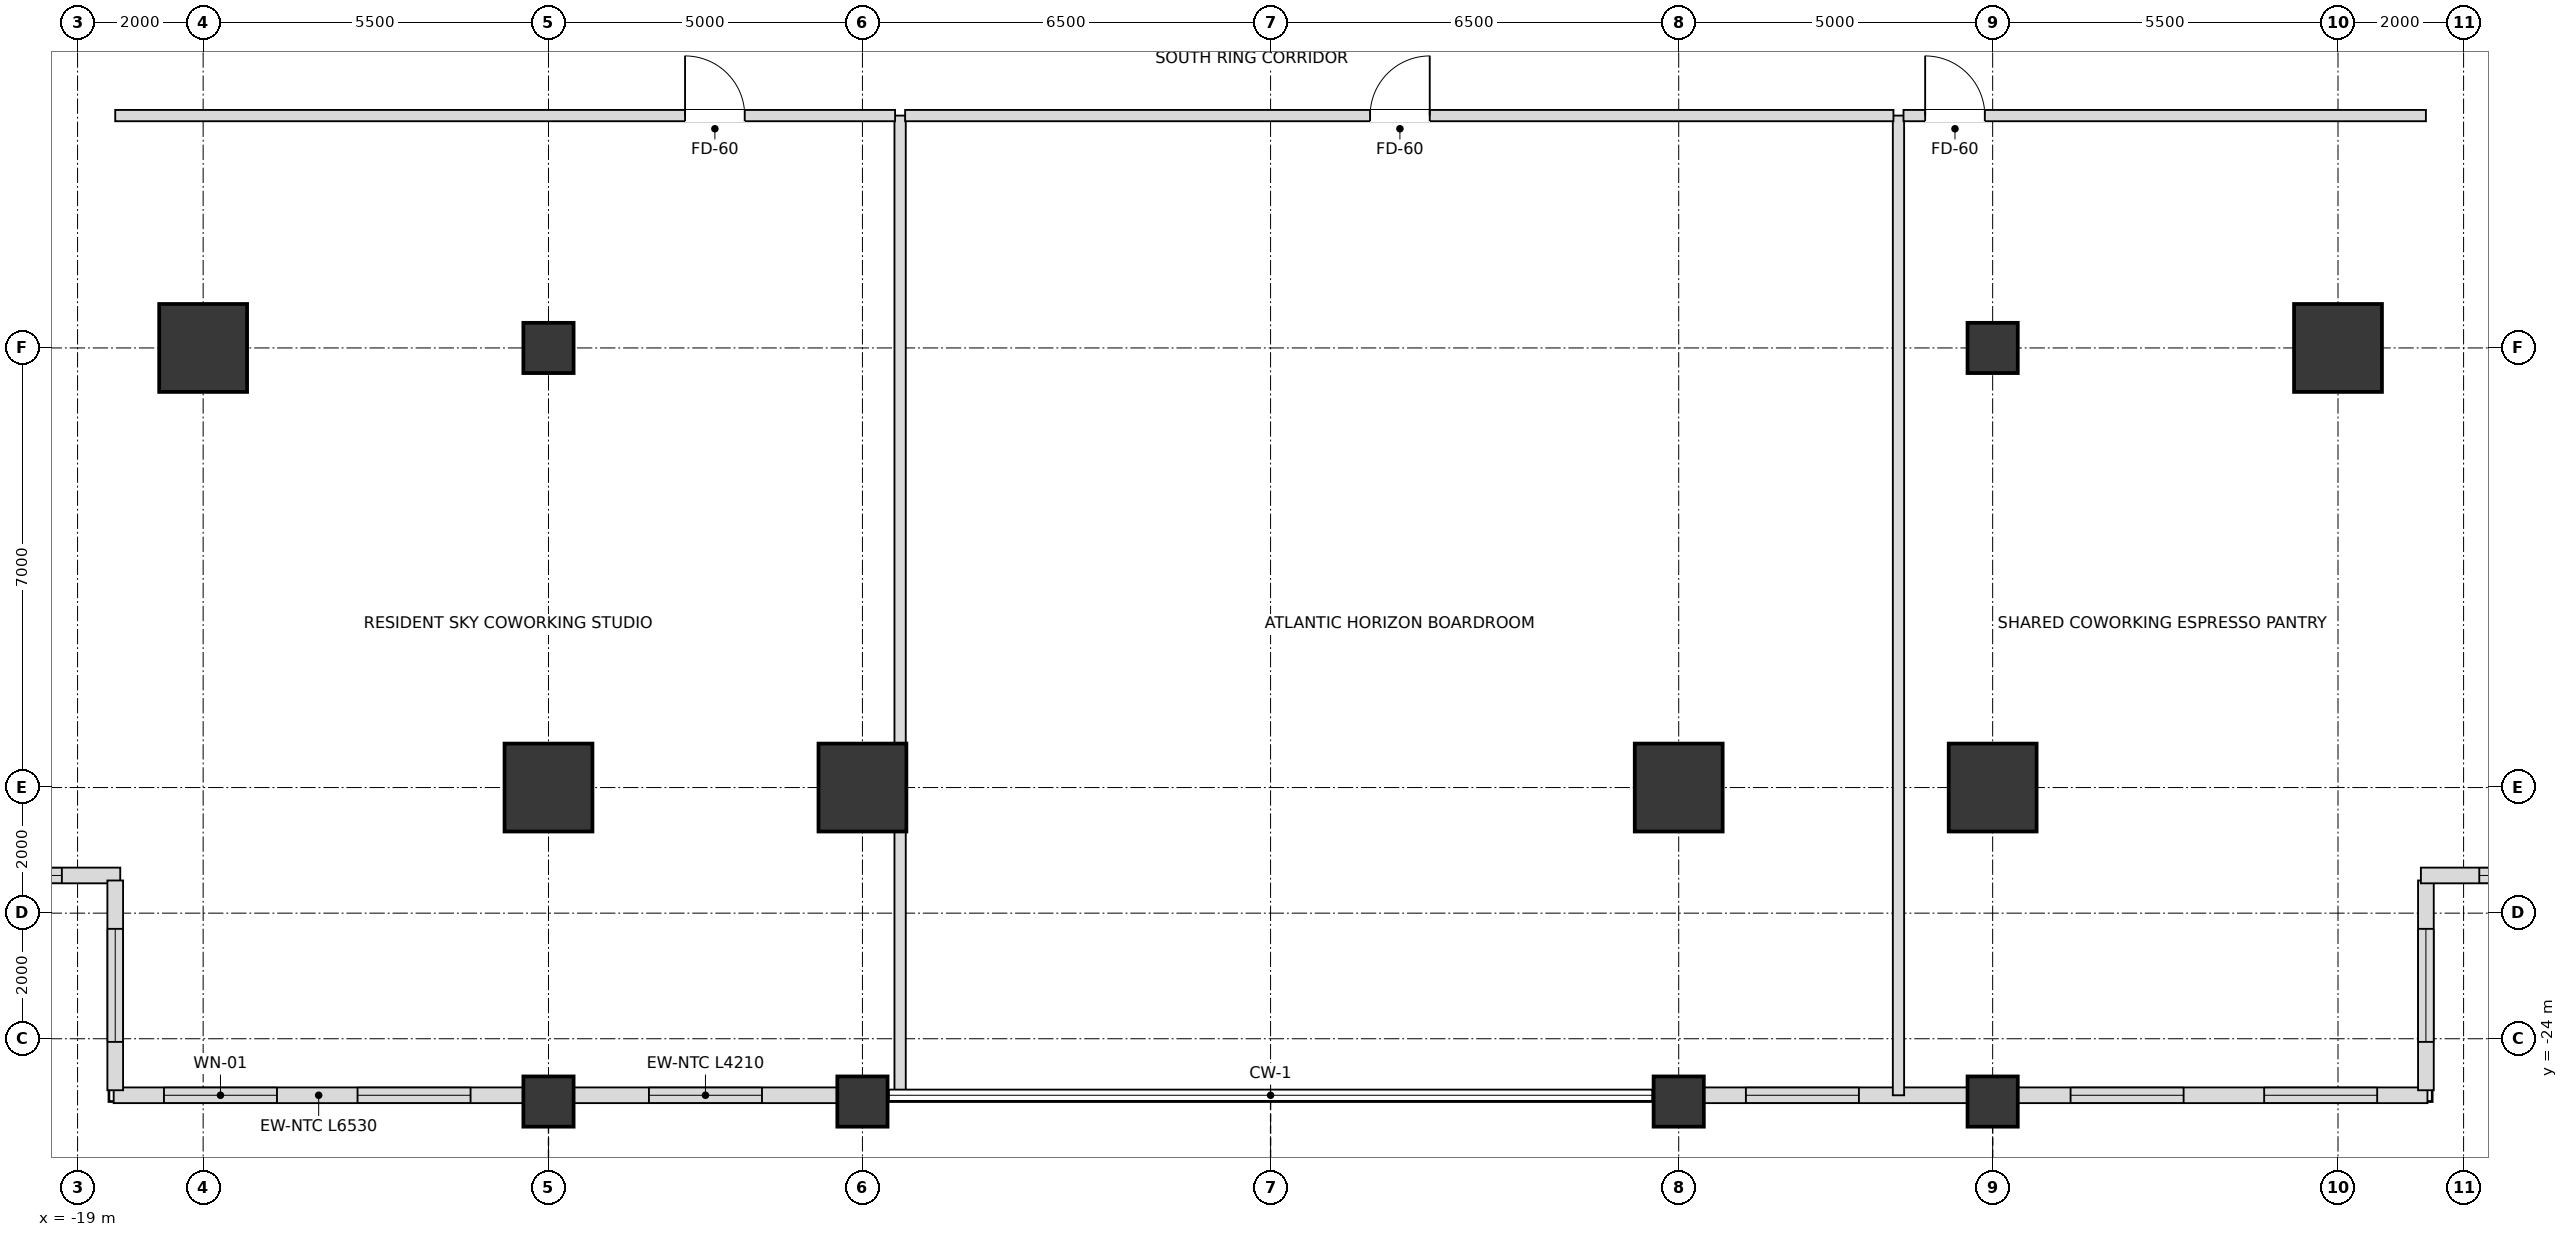
"""IFC4 building model, lengths in metres.
Left out: names, types, materials, properties, quantities, classifications, styles, units other than length and angle.
Written with IfcOpenShell. Run it as: python <this file> out.ifc"""

import sys

from ifc_helpers import new_model, si_unit, direction, frame, frame_2d, origin, origin_2d, place, context, subcontext, project, spatial, rectangle, extrude, element, fill, save


model = new_model("IFC4")
c1 = context("Model", 3, precision=1e-05, world=origin(), true_north=direction((0.0, 1.0)))
c2 = subcontext(c1, "Body", "Model", "MODEL_VIEW")
j1 = project(units=[si_unit("LENGTHUNIT", "METRE"), si_unit("PLANEANGLEUNIT", "RADIAN")], contexts=[c1])
p1 = place(None, origin())
s1 = spatial("IfcSite", under=j1, at=p1, CompositionType="ELEMENT")
p2 = place(p1, origin())
s2 = spatial("IfcBuilding", under=s1, at=p2, CompositionType="ELEMENT")
p3 = place(p2, frame((0.0, 0.0, 61.2)))
s3 = spatial("IfcBuildingStorey", under=s2, at=p3, CompositionType="ELEMENT", Elevation=61.2)
for number, where, z_axis, x_axis in (
    (1, (-11.5, -20.0, 0.0), (0.0, 0.0, 1.0), (1.0, 0.0, 0.0)),
    (2, (-6.5, -20.0, 0.0), (0.0, 0.0, 1.0), (1.0, 0.0, 0.0)),
    (3, (6.5, -20.0, 0.0), (0.0, 0.0, 1.0), (1.0, 0.0, 0.0)),
    (4, (11.5, -20.0, 0.0), (0.0, 0.0, 1.0), (1.0, 0.0, 0.0)),
    (5, (17.0, -13.0, 0.0), (0.0, 0.0, 1.0), (1.0, 0.0, 0.0)),
    (6, (-17.0, -13.0, 0.0), (0.0, 0.0, 1.0), (1.0, 0.0, 0.0)),
):
    element("IfcColumn", number, at=place(p3, frame(where, z_axis=z_axis, x_axis=x_axis)), inside=s3, PredefinedType="USERDEFINED", context=c2, shape_type="SweptSolid", body=[
        extrude(rectangle(XDim=1.4, YDim=1.4, at=origin_2d()), origin(), (0.0, 0.0, 1.0), 3.6),
    ])
for number, where, z_axis, x_axis in (
    (7, (-11.5, -13.0, 0.0), (0.0, 0.0, 1.0), (1.0, 0.0, 0.0)),
    (8, (11.5, -13.0, 0.0), (0.0, 0.0, 1.0), (1.0, 0.0, 0.0)),
    (9, (-11.5, -25.0, 0.0), (0.0, 0.0, 1.0), (1.0, 0.0, 0.0)),
    (10, (-6.5, -25.0, 0.0), (0.0, 0.0, 1.0), (1.0, 0.0, 0.0)),
    (11, (6.5, -25.0, 0.0), (0.0, 0.0, 1.0), (1.0, 0.0, 0.0)),
    (12, (11.5, -25.0, 0.0), (0.0, 0.0, 1.0), (1.0, 0.0, 0.0)),
):
    element("IfcColumn", number, at=place(p3, frame(where, z_axis=z_axis, x_axis=x_axis)), inside=s3, PredefinedType="COLUMN", context=c2, shape_type="SweptSolid", body=[
        extrude(rectangle(XDim=0.8, YDim=0.8, at=origin_2d()), origin(), (0.0, 0.0, 1.0), 3.6),
    ])
p4 = place(p3, frame((-18.425, -24.9, 0.0), z_axis=(0.0, 0.0, 1.0), x_axis=(1.0, 0.0, 0.0)))
e13 = element("IfcWall", 13, at=p4, inside=s3, PredefinedType="SOLIDWALL", context=c2, shape_type="SweptSolid", body=[
    extrude(rectangle(XDim=6.53, YDim=0.25, at=frame_2d((3.265, 0.0))), origin(), (0.0, 0.0, 1.0), 2.736),
])
p5 = place(p4, frame((0.801, 0.0, 0.72)))
e14 = element("IfcOpeningElement", 14, at=p5, cuts=e13, PredefinedType="OPENING", context=c2, shape_type="SweptSolid", body=[
    extrude(rectangle(XDim=1.8, YDim=1.68, at=frame_2d((0.9, 0.84))), frame((0.0, 0.135, 0.0), z_axis=(0.0, -1.0, 0.0), x_axis=(1.0, 0.0, 0.0)), (0.0, 0.0, 1.0), 0.27),
])
p6 = place(p4, frame((3.884, 0.0, 0.72)))
e15 = element("IfcOpeningElement", 15, at=p6, cuts=e13, PredefinedType="OPENING", context=c2, shape_type="SweptSolid", body=[
    extrude(rectangle(XDim=1.8, YDim=1.68, at=frame_2d((0.9, 0.84))), frame((0.0, 0.135, 0.0), z_axis=(0.0, -1.0, 0.0), x_axis=(1.0, 0.0, 0.0)), (0.0, 0.0, 1.0), 0.27),
])
p7 = place(p3, frame((-11.105, -24.9, 0.0), z_axis=(0.0, 0.0, 1.0), x_axis=(1.0, 0.0, 0.0)))
e16 = element("IfcWall", 16, at=p7, inside=s3, PredefinedType="SOLIDWALL", context=c2, shape_type="SweptSolid", body=[
    extrude(rectangle(XDim=4.21, YDim=0.25, at=frame_2d((2.105, 0.0))), origin(), (0.0, 0.0, 1.0), 2.736),
])
p8 = place(p7, frame((1.205, 0.0, 0.72)))
e17 = element("IfcOpeningElement", 17, at=p8, cuts=e16, PredefinedType="OPENING", context=c2, shape_type="SweptSolid", body=[
    extrude(rectangle(XDim=1.8, YDim=1.68, at=frame_2d((0.9, 0.84))), frame((0.0, 0.135, 0.0), z_axis=(0.0, -1.0, 0.0), x_axis=(1.0, 0.0, 0.0)), (0.0, 0.0, 1.0), 0.27),
])
p9 = place(p3, frame((6.895, -24.9, 0.0), z_axis=(0.0, 0.0, 1.0), x_axis=(1.0, 0.0, 0.0)))
e18 = element("IfcWall", 18, at=p9, inside=s3, PredefinedType="SOLIDWALL", context=c2, shape_type="SweptSolid", body=[
    extrude(rectangle(XDim=4.21, YDim=0.25, at=frame_2d((2.105, 0.0))), origin(), (0.0, 0.0, 1.0), 2.736),
])
p10 = place(p9, frame((0.675, 0.0, 0.72)))
e19 = element("IfcOpeningElement", 19, at=p10, cuts=e18, PredefinedType="OPENING", context=c2, shape_type="SweptSolid", body=[
    extrude(rectangle(XDim=1.8, YDim=1.68, at=frame_2d((0.9, 0.84))), frame((0.0, 0.135, 0.0), z_axis=(0.0, -1.0, 0.0), x_axis=(1.0, 0.0, 0.0)), (0.0, 0.0, 1.0), 0.27),
])
p11 = place(p3, frame((11.895, -24.9, 0.0), z_axis=(0.0, 0.0, 1.0), x_axis=(1.0, 0.0, 0.0)))
e20 = element("IfcWall", 20, at=p11, inside=s3, PredefinedType="SOLIDWALL", context=c2, shape_type="SweptSolid", body=[
    extrude(rectangle(XDim=6.53, YDim=0.25, at=frame_2d((3.265, 0.0))), origin(), (0.0, 0.0, 1.0), 2.736),
])
p12 = place(p11, frame((0.846, 0.0, 0.72)))
e21 = element("IfcOpeningElement", 21, at=p12, cuts=e20, PredefinedType="OPENING", context=c2, shape_type="SweptSolid", body=[
    extrude(rectangle(XDim=1.8, YDim=1.68, at=frame_2d((0.9, 0.84))), frame((0.0, 0.135, 0.0), z_axis=(0.0, -1.0, 0.0), x_axis=(1.0, 0.0, 0.0)), (0.0, 0.0, 1.0), 0.27),
])
p13 = place(p11, frame((3.929, 0.0, 0.72)))
e22 = element("IfcOpeningElement", 22, at=p13, cuts=e20, PredefinedType="OPENING", context=c2, shape_type="SweptSolid", body=[
    extrude(rectangle(XDim=1.8, YDim=1.68, at=frame_2d((0.9, 0.84))), frame((0.0, 0.135, 0.0), z_axis=(0.0, -1.0, 0.0), x_axis=(1.0, 0.0, 0.0)), (0.0, 0.0, 1.0), 0.27),
])
p14 = place(p3, frame((-21.98, -21.4, 0.0), z_axis=(0.0, 0.0, 1.0), x_axis=(1.0, 0.0, 0.0)))
e23 = element("IfcWall", 23, at=p14, inside=s3, PredefinedType="SOLIDWALL", context=c2, shape_type="SweptSolid", body=[
    extrude(rectangle(XDim=3.66, YDim=0.25, at=frame_2d((1.83, 0.0))), origin(), (0.0, 0.0, 1.0), 2.736),
])
p15 = place(p14, frame((0.93, 0.0, 0.72)))
e24 = element("IfcOpeningElement", 24, at=p15, cuts=e23, PredefinedType="OPENING", context=c2, shape_type="SweptSolid", body=[
    extrude(rectangle(XDim=1.8, YDim=1.68, at=frame_2d((0.9, 0.84))), frame((0.0, 0.135, 0.0), z_axis=(0.0, -1.0, 0.0), x_axis=(1.0, 0.0, 0.0)), (0.0, 0.0, 1.0), 0.27),
])
p16 = place(p3, frame((-18.4, -21.48, 0.0), z_axis=(0.0, 0.0, 1.0), x_axis=(0.0, -1.0, 0.0)))
e25 = element("IfcWall", 25, at=p16, inside=s3, PredefinedType="SOLIDWALL", context=c2, shape_type="SweptSolid", body=[
    extrude(rectangle(XDim=3.34, YDim=0.25, at=frame_2d((1.67, 0.0))), origin(), (0.0, 0.0, 1.0), 2.736),
])
p17 = place(p16, frame((0.77, 0.0, 0.72)))
e26 = element("IfcOpeningElement", 26, at=p17, cuts=e25, PredefinedType="OPENING", context=c2, shape_type="SweptSolid", body=[
    extrude(rectangle(XDim=1.8, YDim=1.68, at=frame_2d((0.9, 0.84))), frame((0.0, 0.135, 0.0), z_axis=(0.0, -1.0, 0.0), x_axis=(1.0, 0.0, 0.0)), (0.0, 0.0, 1.0), 0.27),
])
p18 = place(p3, frame((18.4, -24.82, 0.0), z_axis=(0.0, 0.0, 1.0), x_axis=(0.0, 1.0, 0.0)))
e27 = element("IfcWall", 27, at=p18, inside=s3, PredefinedType="SOLIDWALL", context=c2, shape_type="SweptSolid", body=[
    extrude(rectangle(XDim=3.34, YDim=0.25, at=frame_2d((1.67, 0.0))), origin(), (0.0, 0.0, 1.0), 2.736),
])
p19 = place(p18, frame((0.77, 0.0, 0.72)))
e28 = element("IfcOpeningElement", 28, at=p19, cuts=e27, PredefinedType="OPENING", context=c2, shape_type="SweptSolid", body=[
    extrude(rectangle(XDim=1.8, YDim=1.68, at=frame_2d((0.9, 0.84))), frame((0.0, 0.135, 0.0), z_axis=(0.0, -1.0, 0.0), x_axis=(1.0, 0.0, 0.0)), (0.0, 0.0, 1.0), 0.27),
])
p20 = place(p3, frame((18.32, -21.4, 0.0), z_axis=(0.0, 0.0, 1.0), x_axis=(1.0, 0.0, 0.0)))
e29 = element("IfcWall", 29, at=p20, inside=s3, PredefinedType="SOLIDWALL", context=c2, shape_type="SweptSolid", body=[
    extrude(rectangle(XDim=3.66, YDim=0.25, at=frame_2d((1.83, 0.0))), origin(), (0.0, 0.0, 1.0), 2.736),
])
p21 = place(p20, frame((0.93, 0.0, 0.72)))
e30 = element("IfcOpeningElement", 30, at=p21, cuts=e29, PredefinedType="OPENING", context=c2, shape_type="SweptSolid", body=[
    extrude(rectangle(XDim=1.8, YDim=1.68, at=frame_2d((0.9, 0.84))), frame((0.0, 0.135, 0.0), z_axis=(0.0, -1.0, 0.0), x_axis=(1.0, 0.0, 0.0)), (0.0, 0.0, 1.0), 0.27),
])
for number, where, z_axis, x_axis in (
    (31, (-5.9, -24.9, 0.0), (0.0, 0.0, 1.0), (0.0, 1.0, 0.0)),
    (32, (10.0, -24.9, 0.0), (0.0, 0.0, 1.0), (0.0, 1.0, 0.0)),
):
    element("IfcWall", number, at=place(p3, frame(where, z_axis=z_axis, x_axis=x_axis)), inside=s3, PredefinedType="PARTITIONING", context=c2, shape_type="SweptSolid", body=[
        extrude(rectangle(XDim=15.6, YDim=0.18, at=frame_2d((7.8, 0.0))), origin(), (0.0, 0.0, 1.0), 2.816),
    ])
p22 = place(p3, frame((-18.4, -9.3, 0.0), z_axis=(0.0, 0.0, 1.0), x_axis=(1.0, 0.0, 0.0)))
e33 = element("IfcWall", 33, at=p22, inside=s3, PredefinedType="PARTITIONING", context=c2, shape_type="SweptSolid", body=[
    extrude(rectangle(XDim=12.42, YDim=0.18, at=frame_2d((6.21, 0.0))), origin(), (0.0, 0.0, 1.0), 2.816),
])
p23 = place(p22, frame((9.075, 0.0, 0.0)))
e34 = element("IfcOpeningElement", 34, at=p23, cuts=e33, PredefinedType="OPENING", context=c2, shape_type="SweptSolid", body=[
    extrude(rectangle(XDim=0.95, YDim=2.15, at=frame_2d((0.475, 1.075))), frame((0.0, 0.1, 0.0), z_axis=(0.0, -1.0, 0.0), x_axis=(1.0, 0.0, 0.0)), (0.0, 0.0, 1.0), 0.2),
])
p24 = place(p3, frame((-5.82, -9.3, 0.0), z_axis=(0.0, 0.0, 1.0), x_axis=(1.0, 0.0, 0.0)))
e35 = element("IfcWall", 35, at=p24, inside=s3, PredefinedType="PARTITIONING", context=c2, shape_type="SweptSolid", body=[
    extrude(rectangle(XDim=15.74, YDim=0.18, at=frame_2d((7.87, 0.0))), origin(), (0.0, 0.0, 1.0), 2.816),
])
p25 = place(p24, frame((7.405, 0.0, 0.0)))
e36 = element("IfcOpeningElement", 36, at=p25, cuts=e35, PredefinedType="OPENING", context=c2, shape_type="SweptSolid", body=[
    extrude(rectangle(XDim=0.95, YDim=2.15, at=frame_2d((0.475, 1.075))), frame((0.0, 0.1, 0.0), z_axis=(0.0, -1.0, 0.0), x_axis=(1.0, 0.0, 0.0)), (0.0, 0.0, 1.0), 0.2),
])
p26 = place(p3, frame((10.08, -9.3, 0.0), z_axis=(0.0, 0.0, 1.0), x_axis=(1.0, 0.0, 0.0)))
e37 = element("IfcWall", 37, at=p26, inside=s3, PredefinedType="PARTITIONING", context=c2, shape_type="SweptSolid", body=[
    extrude(rectangle(XDim=8.32, YDim=0.18, at=frame_2d((4.16, 0.0))), origin(), (0.0, 0.0, 1.0), 2.816),
])
p27 = place(p26, frame((0.345, 0.0, 0.0)))
e38 = element("IfcOpeningElement", 38, at=p27, cuts=e37, PredefinedType="OPENING", context=c2, shape_type="SweptSolid", body=[
    extrude(rectangle(XDim=0.95, YDim=2.15, at=frame_2d((0.475, 1.075))), frame((0.0, 0.1, 0.0), z_axis=(0.0, -1.0, 0.0), x_axis=(1.0, 0.0, 0.0)), (0.0, 0.0, 1.0), 0.2),
])
p28 = place(p5, origin())
e39 = element("IfcWindow", 39, at=p28, inside=s3, PartitioningType="SINGLE_PANEL", PredefinedType="WINDOW", context=c2, shape_type="SweptSolid", body=[
    extrude(rectangle(XDim=1.8, YDim=1.68, at=frame_2d((0.9, 0.84))), frame((0.0, 0.03, 0.0), z_axis=(0.0, -1.0, 0.0), x_axis=(1.0, 0.0, 0.0)), (0.0, 0.0, 1.0), 0.06),
])
fill(e14, e39)
p29 = place(p6, origin())
e40 = element("IfcWindow", 40, at=p29, inside=s3, PartitioningType="SINGLE_PANEL", PredefinedType="WINDOW", context=c2, shape_type="SweptSolid", body=[
    extrude(rectangle(XDim=1.8, YDim=1.68, at=frame_2d((0.9, 0.84))), frame((0.0, 0.03, 0.0), z_axis=(0.0, -1.0, 0.0), x_axis=(1.0, 0.0, 0.0)), (0.0, 0.0, 1.0), 0.06),
])
fill(e15, e40)
p30 = place(p8, origin())
e41 = element("IfcWindow", 41, at=p30, inside=s3, PartitioningType="SINGLE_PANEL", PredefinedType="WINDOW", context=c2, shape_type="SweptSolid", body=[
    extrude(rectangle(XDim=1.8, YDim=1.68, at=frame_2d((0.9, 0.84))), frame((0.0, 0.03, 0.0), z_axis=(0.0, -1.0, 0.0), x_axis=(1.0, 0.0, 0.0)), (0.0, 0.0, 1.0), 0.06),
])
fill(e17, e41)
p31 = place(p10, origin())
e42 = element("IfcWindow", 42, at=p31, inside=s3, PartitioningType="SINGLE_PANEL", PredefinedType="WINDOW", context=c2, shape_type="SweptSolid", body=[
    extrude(rectangle(XDim=1.8, YDim=1.68, at=frame_2d((0.9, 0.84))), frame((0.0, 0.03, 0.0), z_axis=(0.0, -1.0, 0.0), x_axis=(1.0, 0.0, 0.0)), (0.0, 0.0, 1.0), 0.06),
])
fill(e19, e42)
p32 = place(p12, origin())
e43 = element("IfcWindow", 43, at=p32, inside=s3, PartitioningType="SINGLE_PANEL", PredefinedType="WINDOW", context=c2, shape_type="SweptSolid", body=[
    extrude(rectangle(XDim=1.8, YDim=1.68, at=frame_2d((0.9, 0.84))), frame((0.0, 0.03, 0.0), z_axis=(0.0, -1.0, 0.0), x_axis=(1.0, 0.0, 0.0)), (0.0, 0.0, 1.0), 0.06),
])
fill(e21, e43)
p33 = place(p13, origin())
e44 = element("IfcWindow", 44, at=p33, inside=s3, PartitioningType="SINGLE_PANEL", PredefinedType="WINDOW", context=c2, shape_type="SweptSolid", body=[
    extrude(rectangle(XDim=1.8, YDim=1.68, at=frame_2d((0.9, 0.84))), frame((0.0, 0.03, 0.0), z_axis=(0.0, -1.0, 0.0), x_axis=(1.0, 0.0, 0.0)), (0.0, 0.0, 1.0), 0.06),
])
fill(e22, e44)
p34 = place(p15, origin())
e45 = element("IfcWindow", 45, at=p34, inside=s3, PartitioningType="SINGLE_PANEL", PredefinedType="WINDOW", context=c2, shape_type="SweptSolid", body=[
    extrude(rectangle(XDim=1.8, YDim=1.68, at=frame_2d((0.9, 0.84))), frame((0.0, 0.03, 0.0), z_axis=(0.0, -1.0, 0.0), x_axis=(1.0, 0.0, 0.0)), (0.0, 0.0, 1.0), 0.06),
])
fill(e24, e45)
p35 = place(p17, origin())
e46 = element("IfcWindow", 46, at=p35, inside=s3, PartitioningType="SINGLE_PANEL", PredefinedType="WINDOW", context=c2, shape_type="SweptSolid", body=[
    extrude(rectangle(XDim=1.8, YDim=1.68, at=frame_2d((0.9, 0.84))), frame((0.0, 0.03, 0.0), z_axis=(0.0, -1.0, 0.0), x_axis=(1.0, 0.0, 0.0)), (0.0, 0.0, 1.0), 0.06),
])
fill(e26, e46)
p36 = place(p19, origin())
e47 = element("IfcWindow", 47, at=p36, inside=s3, PartitioningType="SINGLE_PANEL", PredefinedType="WINDOW", context=c2, shape_type="SweptSolid", body=[
    extrude(rectangle(XDim=1.8, YDim=1.68, at=frame_2d((0.9, 0.84))), frame((0.0, 0.03, 0.0), z_axis=(0.0, -1.0, 0.0), x_axis=(1.0, 0.0, 0.0)), (0.0, 0.0, 1.0), 0.06),
])
fill(e28, e47)
p37 = place(p21, origin())
e48 = element("IfcWindow", 48, at=p37, inside=s3, PartitioningType="SINGLE_PANEL", PredefinedType="WINDOW", context=c2, shape_type="SweptSolid", body=[
    extrude(rectangle(XDim=1.8, YDim=1.68, at=frame_2d((0.9, 0.84))), frame((0.0, 0.03, 0.0), z_axis=(0.0, -1.0, 0.0), x_axis=(1.0, 0.0, 0.0)), (0.0, 0.0, 1.0), 0.06),
])
fill(e30, e48)
p38 = place(p23, origin())
e49 = element("IfcDoor", 49, at=p38, inside=s3, OperationType="SINGLE_SWING_LEFT", PredefinedType="DOOR", context=c2, shape_type="SweptSolid", body=[
    extrude(rectangle(XDim=0.95, YDim=2.15, at=frame_2d((0.475, 1.075))), frame((0.0, 0.025, 0.0), z_axis=(0.0, -1.0, 0.0), x_axis=(1.0, 0.0, 0.0)), (0.0, 0.0, 1.0), 0.05),
])
fill(e34, e49)
p39 = place(p25, origin())
e50 = element("IfcDoor", 50, at=p39, inside=s3, OperationType="SINGLE_SWING_RIGHT", PredefinedType="DOOR", context=c2, shape_type="SweptSolid", body=[
    extrude(rectangle(XDim=0.95, YDim=2.15, at=frame_2d((0.475, 1.075))), frame((0.0, 0.025, 0.0), z_axis=(0.0, -1.0, 0.0), x_axis=(1.0, 0.0, 0.0)), (0.0, 0.0, 1.0), 0.05),
])
fill(e36, e50)
p40 = place(p27, origin())
e51 = element("IfcDoor", 51, at=p40, inside=s3, OperationType="SINGLE_SWING_LEFT", PredefinedType="DOOR", context=c2, shape_type="SweptSolid", body=[
    extrude(rectangle(XDim=0.95, YDim=2.15, at=frame_2d((0.475, 1.075))), frame((0.0, 0.025, 0.0), z_axis=(0.0, -1.0, 0.0), x_axis=(1.0, 0.0, 0.0)), (0.0, 0.0, 1.0), 0.05),
])
fill(e38, e51)
save(model, sys.argv[1])
